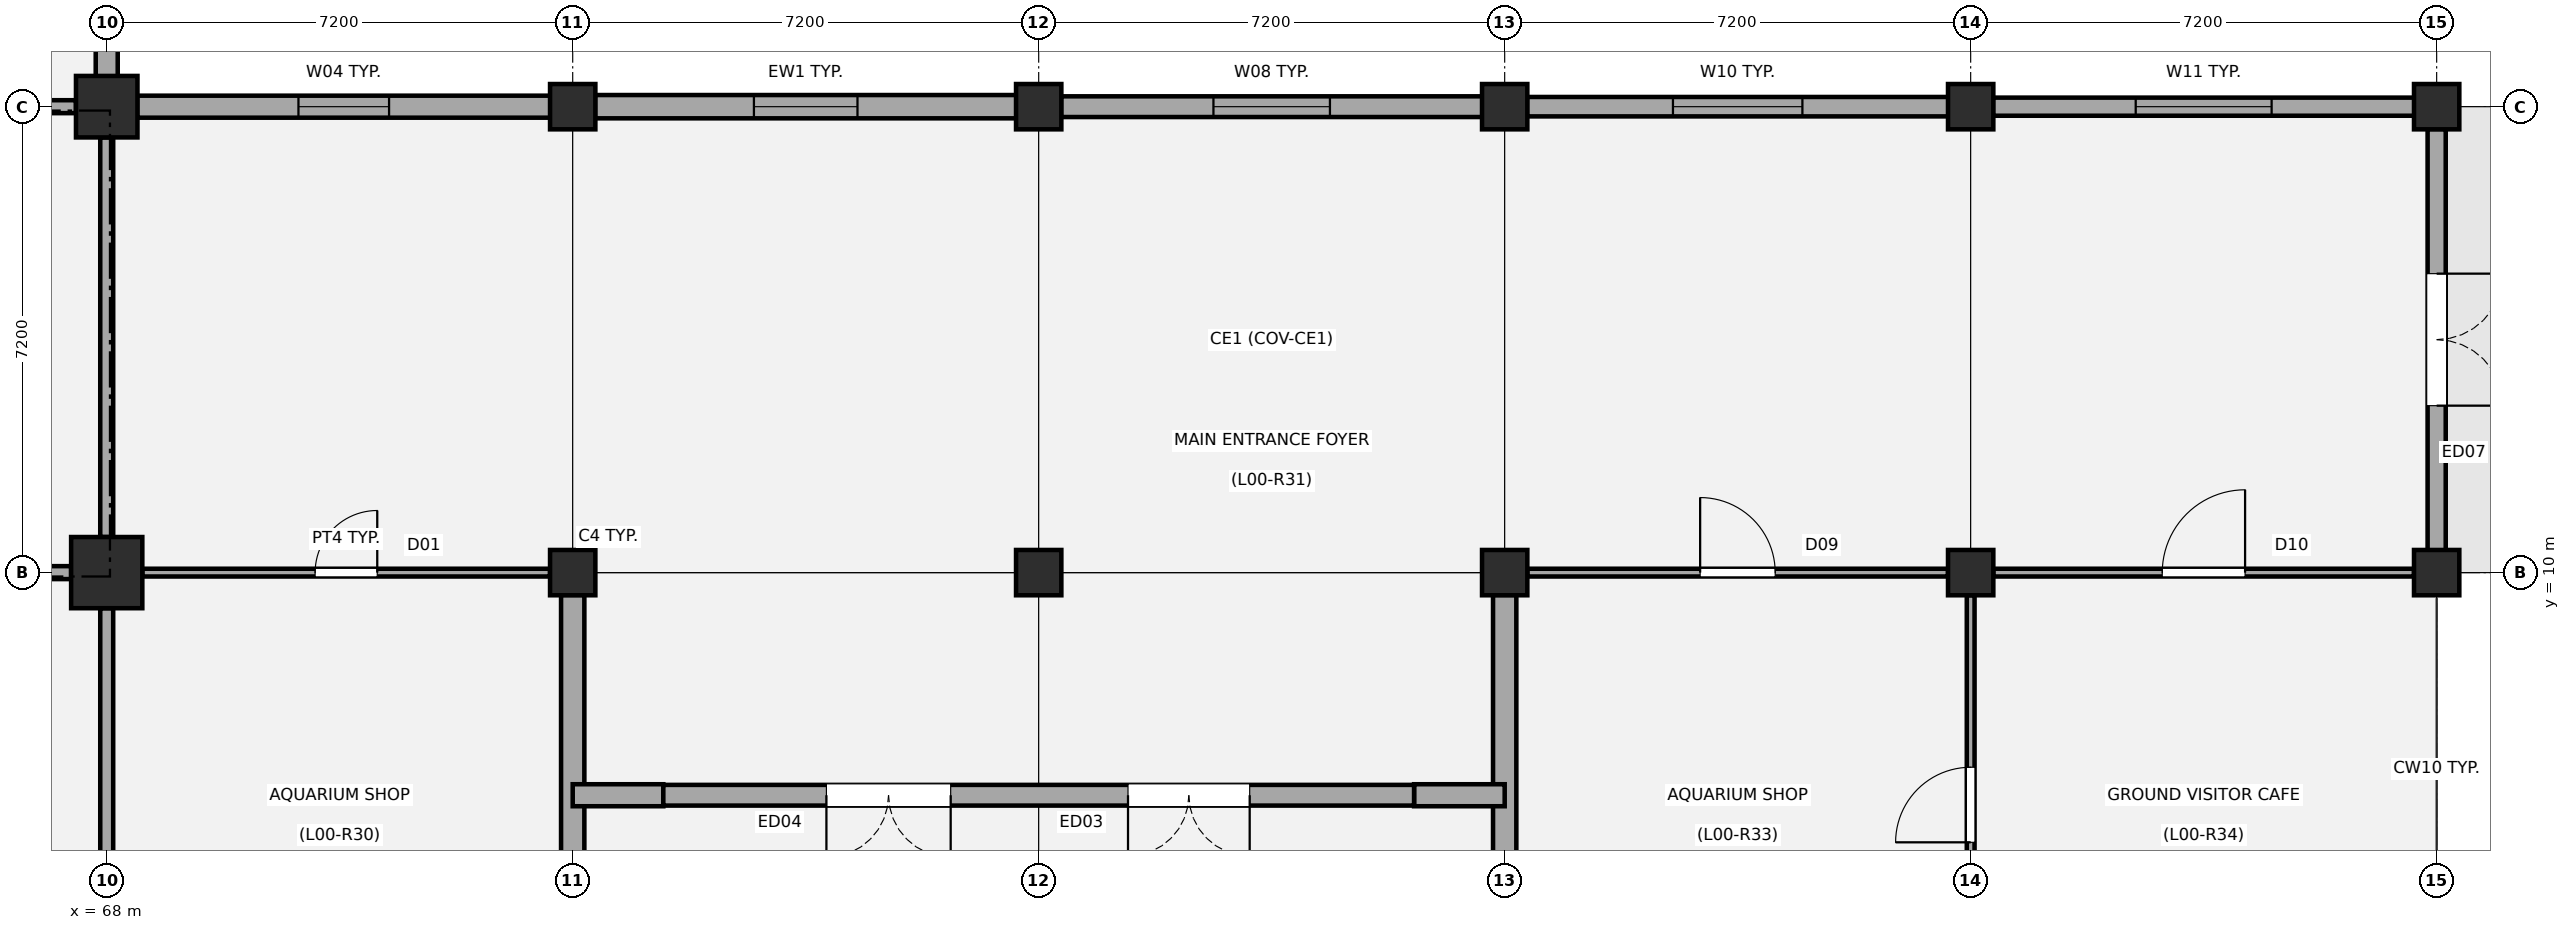
"""IFC4 building model, lengths in metres.
Left out: names, types, materials, properties, quantities, classifications, styles, units other than length and angle.
Written with IfcOpenShell. Run it as: python <this file> out.ifc"""

import sys

from ifc_helpers import new_model, si_unit, direction, frame, frame_2d, origin, origin_2d, place, context, subcontext, project, spatial, rectangle, extrude, element, fill, save


model = new_model("IFC4")
c1 = context("Model", 3, precision=1e-05, world=origin(), true_north=direction((0.0, 1.0)))
c2 = subcontext(c1, "Body", "Model", "MODEL_VIEW")
j1 = project(units=[si_unit("LENGTHUNIT", "METRE"), si_unit("PLANEANGLEUNIT", "RADIAN")], contexts=[c1])
p1 = place(None, origin())
s1 = spatial("IfcSite", under=j1, at=p1, CompositionType="ELEMENT")
p2 = place(p1, origin())
s2 = spatial("IfcBuilding", under=s1, at=p2, CompositionType="ELEMENT")
p3 = place(p2, origin())
s3 = spatial("IfcBuildingStorey", under=s2, at=p3, CompositionType="ELEMENT", Elevation=0.0)
p4 = place(p3, frame((68.0, 10.0, -0.35), z_axis=(0.0, 0.0, 1.0), x_axis=(1.0, 0.0, 0.0)))
e1 = element("IfcColumn", 1, at=p4, inside=s3, PredefinedType="COLUMN", context=c2, shape_type="SweptSolid", body=[
    extrude(rectangle(XDim=1.1, YDim=1.1, at=origin_2d()), origin(), (0.0, 0.0, 1.0), 5.03),
])
p5 = place(p3, frame((68.0, 17.2, -0.35), z_axis=(0.0, 0.0, 1.0), x_axis=(1.0, 0.0, 0.0)))
e2 = element("IfcColumn", 2, at=p5, inside=s3, PredefinedType="COLUMN", context=c2, shape_type="SweptSolid", body=[
    extrude(rectangle(XDim=0.95, YDim=0.95, at=origin_2d()), origin(), (0.0, 0.0, 1.0), 5.03),
])
for number, where, z_axis, x_axis in (
    (3, (75.2, 10.0, -0.35), (0.0, 0.0, 1.0), (1.0, 0.0, 0.0)),
    (4, (75.2, 17.2, -0.35), (0.0, 0.0, 1.0), (1.0, 0.0, 0.0)),
    (5, (82.4, 10.0, -0.35), (0.0, 0.0, 1.0), (1.0, 0.0, 0.0)),
    (6, (82.4, 17.2, -0.35), (0.0, 0.0, 1.0), (1.0, 0.0, 0.0)),
    (7, (89.6, 10.0, -0.35), (0.0, 0.0, 1.0), (1.0, 0.0, 0.0)),
    (8, (89.6, 17.2, -0.35), (0.0, 0.0, 1.0), (1.0, 0.0, 0.0)),
    (9, (96.8, 10.0, -0.35), (0.0, 0.0, 1.0), (1.0, 0.0, 0.0)),
    (10, (96.8, 17.2, -0.35), (0.0, 0.0, 1.0), (1.0, 0.0, 0.0)),
    (11, (104.0, 10.0, -0.35), (0.0, 0.0, 1.0), (1.0, 0.0, 0.0)),
    (12, (104.0, 17.2, -0.35), (0.0, 0.0, 1.0), (1.0, 0.0, 0.0)),
):
    element("IfcColumn", number, at=place(p3, frame(where, z_axis=z_axis, x_axis=x_axis)), inside=s3, PredefinedType="COLUMN", context=c2, shape_type="SweptSolid", body=[
        extrude(rectangle(XDim=0.7, YDim=0.7, at=origin_2d()), origin(), (0.0, 0.0, 1.0), 5.03),
    ])
p6 = place(p3, frame((68.47, 17.2, 0.0), z_axis=(0.0, 0.0, 1.0), x_axis=(1.0, 0.0, 0.0)))
e13 = element("IfcWall", 13, at=p6, inside=s3, PredefinedType="STANDARD", context=c2, shape_type="SweptSolid", body=[
    extrude(rectangle(XDim=6.385, YDim=0.34, at=frame_2d((3.192, 0.0))), origin(), (0.0, 0.0, 1.0), 3.67),
])
p7 = place(p6, frame((2.492, 0.0, 0.95)))
e14 = element("IfcOpeningElement", 14, at=p7, cuts=e13, PredefinedType="OPENING", context=c2, shape_type="SweptSolid", body=[
    extrude(rectangle(XDim=1.4, YDim=1.6, at=frame_2d((0.7, 0.8))), frame((0.0, 0.18, 0.0), z_axis=(0.0, -1.0, 0.0), x_axis=(1.0, 0.0, 0.0)), (0.0, 0.0, 1.0), 0.36),
])
p8 = place(p3, frame((75.545, 17.2, 0.0), z_axis=(0.0, 0.0, 1.0), x_axis=(1.0, 0.0, 0.0)))
e15 = element("IfcWall", 15, at=p8, inside=s3, PredefinedType="STANDARD", context=c2, shape_type="SweptSolid", body=[
    extrude(rectangle(XDim=6.51, YDim=0.36, at=frame_2d((3.255, 0.0))), origin(), (0.0, 0.0, 1.0), 3.67),
])
p9 = place(p8, frame((2.455, 0.0, 0.95)))
e16 = element("IfcOpeningElement", 16, at=p9, cuts=e15, PredefinedType="OPENING", context=c2, shape_type="SweptSolid", body=[
    extrude(rectangle(XDim=1.6, YDim=1.7, at=frame_2d((0.8, 0.85))), frame((0.0, 0.19, 0.0), z_axis=(0.0, -1.0, 0.0), x_axis=(1.0, 0.0, 0.0)), (0.0, 0.0, 1.0), 0.38),
])
p10 = place(p3, frame((82.745, 17.2, 0.0), z_axis=(0.0, 0.0, 1.0), x_axis=(1.0, 0.0, 0.0)))
e17 = element("IfcWall", 17, at=p10, inside=s3, PredefinedType="STANDARD", context=c2, shape_type="SweptSolid", body=[
    extrude(rectangle(XDim=6.51, YDim=0.32, at=frame_2d((3.255, 0.0))), origin(), (0.0, 0.0, 1.0), 3.67),
])
p11 = place(p10, frame((2.355, 0.0, 0.95)))
e18 = element("IfcOpeningElement", 18, at=p11, cuts=e17, PredefinedType="OPENING", context=c2, shape_type="SweptSolid", body=[
    extrude(rectangle(XDim=1.8, YDim=1.8, at=frame_2d((0.9, 0.9))), frame((0.0, 0.17, 0.0), z_axis=(0.0, -1.0, 0.0), x_axis=(1.0, 0.0, 0.0)), (0.0, 0.0, 1.0), 0.34),
])
p12 = place(p3, frame((89.945, 17.2, 0.0), z_axis=(0.0, 0.0, 1.0), x_axis=(1.0, 0.0, 0.0)))
e19 = element("IfcWall", 19, at=p12, inside=s3, PredefinedType="STANDARD", context=c2, shape_type="SweptSolid", body=[
    extrude(rectangle(XDim=6.51, YDim=0.3, at=frame_2d((3.255, 0.0))), origin(), (0.0, 0.0, 1.0), 3.67),
])
p13 = place(p12, frame((2.255, 0.0, 0.95)))
e20 = element("IfcOpeningElement", 20, at=p13, cuts=e19, PredefinedType="OPENING", context=c2, shape_type="SweptSolid", body=[
    extrude(rectangle(XDim=2.0, YDim=1.9, at=frame_2d((1.0, 0.95))), frame((0.0, 0.16, 0.0), z_axis=(0.0, -1.0, 0.0), x_axis=(1.0, 0.0, 0.0)), (0.0, 0.0, 1.0), 0.32),
])
p14 = place(p3, frame((97.145, 17.2, 0.0), z_axis=(0.0, 0.0, 1.0), x_axis=(1.0, 0.0, 0.0)))
e21 = element("IfcWall", 21, at=p14, inside=s3, PredefinedType="STANDARD", context=c2, shape_type="SweptSolid", body=[
    extrude(rectangle(XDim=6.51, YDim=0.28, at=frame_2d((3.255, 0.0))), origin(), (0.0, 0.0, 1.0), 3.67),
])
p15 = place(p14, frame((2.205, 0.0, 0.95)))
e22 = element("IfcOpeningElement", 22, at=p15, cuts=e21, PredefinedType="OPENING", context=c2, shape_type="SweptSolid", body=[
    extrude(rectangle(XDim=2.1, YDim=1.95, at=frame_2d((1.05, 0.975))), frame((0.0, 0.15, 0.0), z_axis=(0.0, -1.0, 0.0), x_axis=(1.0, 0.0, 0.0)), (0.0, 0.0, 1.0), 0.3),
])
p16 = place(p3, frame((68.0, 23.855, 0.0), z_axis=(0.0, 0.0, 1.0), x_axis=(0.0, -1.0, 0.0)))
e23 = element("IfcWall", 23, at=p16, inside=s3, PredefinedType="STANDARD", context=c2, shape_type="SweptSolid", body=[
    extrude(rectangle(XDim=6.185, YDim=0.34, at=frame_2d((3.093, 0.0))), origin(), (0.0, 0.0, 1.0), 2.47),
])
p17 = place(p3, frame((104.0, 16.855, 0.0), z_axis=(0.0, 0.0, 1.0), x_axis=(0.0, -1.0, 0.0)))
e24 = element("IfcWall", 24, at=p17, inside=s3, PredefinedType="STANDARD", context=c2, shape_type="SweptSolid", body=[
    extrude(rectangle(XDim=6.51, YDim=0.28, at=frame_2d((3.255, 0.0))), origin(), (0.0, 0.0, 1.0), 3.67),
])
p18 = place(p17, frame((2.235, 0.0, 0.0)))
e25 = element("IfcOpeningElement", 25, at=p18, cuts=e24, PredefinedType="OPENING", context=c2, shape_type="SweptSolid", body=[
    extrude(rectangle(XDim=2.04, YDim=2.32, at=frame_2d((1.02, 1.16))), frame((0.0, 0.15, 0.0), z_axis=(0.0, -1.0, 0.0), x_axis=(1.0, 0.0, 0.0)), (0.0, 0.0, 1.0), 0.3),
])
for number, where, z_axis, x_axis in (
    (26, (75.2, 1.56, 0.0), (0.0, 0.0, 1.0), (0.0, 1.0, 0.0)),
    (27, (89.6, 1.56, 0.0), (0.0, 0.0, 1.0), (0.0, 1.0, 0.0)),
):
    element("IfcWall", number, at=place(p3, frame(where, z_axis=z_axis, x_axis=x_axis)), inside=s3, PredefinedType="STANDARD", context=c2, shape_type="SweptSolid", body=[
        extrude(rectangle(XDim=8.095, YDim=0.36, at=frame_2d((4.047, 0.0))), origin(), (0.0, 0.0, 1.0), 3.67),
    ])
for number, where, z_axis, x_axis in (
    (28, (75.2, 6.56, 0.0), (0.0, 0.0, 1.0), (1.0, 0.0, 0.0)),
    (29, (88.2, 6.56, 0.0), (0.0, 0.0, 1.0), (1.0, 0.0, 0.0)),
):
    element("IfcWall", number, at=place(p3, frame(where, z_axis=z_axis, x_axis=x_axis)), inside=s3, PredefinedType="STANDARD", context=c2, shape_type="SweptSolid", body=[
        extrude(rectangle(XDim=1.4, YDim=0.34, at=frame_2d((0.7, 0.0))), origin(), (0.0, 0.0, 1.0), 8.87),
    ])
p19 = place(p3, frame((88.2, 6.56, 0.0), z_axis=(0.0, 0.0, 1.0), x_axis=(-1.0, 0.0, 0.0)))
e30 = element("IfcWall", 30, at=p19, inside=s3, PredefinedType="STANDARD", context=c2, shape_type="SweptSolid", body=[
    extrude(rectangle(XDim=11.6, YDim=0.32, at=frame_2d((5.8, 0.0))), origin(), (0.0, 0.0, 1.0), 2.68),
])
p20 = place(p19, frame((2.54, 0.0, 0.0)))
e31 = element("IfcOpeningElement", 31, at=p20, cuts=e30, PredefinedType="OPENING", context=c2, shape_type="SweptSolid", body=[
    extrude(rectangle(XDim=1.88, YDim=2.24, at=frame_2d((0.94, 1.12))), frame((0.0, 0.17, 0.0), z_axis=(0.0, -1.0, 0.0), x_axis=(1.0, 0.0, 0.0)), (0.0, 0.0, 1.0), 0.34),
])
p21 = place(p19, frame((7.16, 0.0, 0.0)))
e32 = element("IfcOpeningElement", 32, at=p21, cuts=e30, PredefinedType="OPENING", context=c2, shape_type="SweptSolid", body=[
    extrude(rectangle(XDim=1.92, YDim=2.26, at=frame_2d((0.96, 1.13))), frame((0.0, 0.17, 0.0), z_axis=(0.0, -1.0, 0.0), x_axis=(1.0, 0.0, 0.0)), (0.0, 0.0, 1.0), 0.34),
])
p22 = place(p3, frame((68.0, 10.55, 0.0), z_axis=(0.0, 0.0, 1.0), x_axis=(0.0, 1.0, 0.0)))
e33 = element("IfcWall", 33, at=p22, inside=s3, PredefinedType="PARTITIONING", context=c2, shape_type="SweptSolid", body=[
    extrude(rectangle(XDim=6.175, YDim=0.2, at=frame_2d((3.087, 0.0))), origin(), (0.0, 0.0, 1.0), 2.47),
])
p23 = place(p3, frame((65.34, 10.0, 0.0), z_axis=(0.0, 0.0, 1.0), x_axis=(1.0, 0.0, 0.0)))
e34 = element("IfcWall", 34, at=p23, inside=s3, PredefinedType="PARTITIONING", context=c2, shape_type="SweptSolid", body=[
    extrude(rectangle(XDim=2.11, YDim=0.2, at=frame_2d((1.055, 0.0))), origin(), (0.0, 0.0, 1.0), 2.37),
])
p24 = place(p23, frame((0.545, 0.0, 0.0)))
e35 = element("IfcOpeningElement", 35, at=p24, cuts=e34, PredefinedType="OPENING", context=c2, shape_type="SweptSolid", body=[
    extrude(rectangle(XDim=1.02, YDim=2.15, at=frame_2d((0.51, 1.075))), frame((0.0, 0.11, 0.0), z_axis=(0.0, -1.0, 0.0), x_axis=(1.0, 0.0, 0.0)), (0.0, 0.0, 1.0), 0.22),
])
p25 = place(p3, frame((65.34, 17.2, 0.0), z_axis=(0.0, 0.0, 1.0), x_axis=(1.0, 0.0, 0.0)))
e36 = element("IfcWall", 36, at=p25, inside=s3, PredefinedType="PARTITIONING", context=c2, shape_type="SweptSolid", body=[
    extrude(rectangle(XDim=2.185, YDim=0.2, at=frame_2d((1.092, 0.0))), origin(), (0.0, 0.0, 1.0), 2.37),
])
p26 = place(p3, frame((68.0, 3.275, 0.0), z_axis=(0.0, 0.0, 1.0), x_axis=(0.0, 1.0, 0.0)))
e37 = element("IfcWall", 37, at=p26, inside=s3, PredefinedType="PARTITIONING", context=c2, shape_type="SweptSolid", body=[
    extrude(rectangle(XDim=6.175, YDim=0.2, at=frame_2d((3.087, 0.0))), origin(), (0.0, 0.0, 1.0), 2.47),
])
p27 = place(p3, frame((68.55, 10.0, 0.0), z_axis=(0.0, 0.0, 1.0), x_axis=(1.0, 0.0, 0.0)))
e38 = element("IfcWall", 38, at=p27, inside=s3, PredefinedType="PARTITIONING", context=c2, shape_type="SweptSolid", body=[
    extrude(rectangle(XDim=6.3, YDim=0.12, at=frame_2d((3.15, 0.0))), origin(), (0.0, 0.0, 1.0), 3.52),
])
p28 = place(p27, frame((2.67, 0.0, 0.0)))
e39 = element("IfcOpeningElement", 39, at=p28, cuts=e38, PredefinedType="OPENING", context=c2, shape_type="SweptSolid", body=[
    extrude(rectangle(XDim=0.96, YDim=2.1, at=frame_2d((0.48, 1.05))), frame((0.0, 0.07, 0.0), z_axis=(0.0, -1.0, 0.0), x_axis=(1.0, 0.0, 0.0)), (0.0, 0.0, 1.0), 0.14),
])
p29 = place(p3, frame((96.8, 3.175, 0.0), z_axis=(0.0, 0.0, 1.0), x_axis=(0.0, 1.0, 0.0)))
e40 = element("IfcWall", 40, at=p29, inside=s3, PredefinedType="PARTITIONING", context=c2, shape_type="SweptSolid", body=[
    extrude(rectangle(XDim=6.475, YDim=0.12, at=frame_2d((3.237, 0.0))), origin(), (0.0, 0.0, 1.0), 3.62),
])
p30 = place(p29, frame((2.657, 0.0, 0.0)))
e41 = element("IfcOpeningElement", 41, at=p30, cuts=e40, PredefinedType="OPENING", context=c2, shape_type="SweptSolid", body=[
    extrude(rectangle(XDim=1.16, YDim=2.18, at=frame_2d((0.58, 1.09))), frame((0.0, 0.07, 0.0), z_axis=(0.0, -1.0, 0.0), x_axis=(1.0, 0.0, 0.0)), (0.0, 0.0, 1.0), 0.14),
])
p31 = place(p3, frame((89.95, 10.0, 0.0), z_axis=(0.0, 0.0, 1.0), x_axis=(1.0, 0.0, 0.0)))
e42 = element("IfcWall", 42, at=p31, inside=s3, PredefinedType="PARTITIONING", context=c2, shape_type="SweptSolid", body=[
    extrude(rectangle(XDim=6.5, YDim=0.12, at=frame_2d((3.25, 0.0))), origin(), (0.0, 0.0, 1.0), 3.62),
])
p32 = place(p31, frame((2.67, 0.0, 0.0)))
e43 = element("IfcOpeningElement", 43, at=p32, cuts=e42, PredefinedType="OPENING", context=c2, shape_type="SweptSolid", body=[
    extrude(rectangle(XDim=1.16, YDim=2.18, at=frame_2d((0.58, 1.09))), frame((0.0, 0.07, 0.0), z_axis=(0.0, -1.0, 0.0), x_axis=(1.0, 0.0, 0.0)), (0.0, 0.0, 1.0), 0.14),
])
p33 = place(p3, frame((97.15, 10.0, 0.0), z_axis=(0.0, 0.0, 1.0), x_axis=(1.0, 0.0, 0.0)))
e44 = element("IfcWall", 44, at=p33, inside=s3, PredefinedType="PARTITIONING", context=c2, shape_type="SweptSolid", body=[
    extrude(rectangle(XDim=6.5, YDim=0.12, at=frame_2d((3.25, 0.0))), origin(), (0.0, 0.0, 1.0), 3.52),
])
p34 = place(p33, frame((2.61, 0.0, 0.0)))
e45 = element("IfcOpeningElement", 45, at=p34, cuts=e44, PredefinedType="OPENING", context=c2, shape_type="SweptSolid", body=[
    extrude(rectangle(XDim=1.28, YDim=2.2, at=frame_2d((0.64, 1.1))), frame((0.0, 0.07, 0.0), z_axis=(0.0, -1.0, 0.0), x_axis=(1.0, 0.0, 0.0)), (0.0, 0.0, 1.0), 0.14),
])
p35 = place(p7, origin())
e46 = element("IfcWindow", 46, at=p35, inside=s3, PartitioningType="SINGLE_PANEL", PredefinedType="WINDOW", context=c2, shape_type="SweptSolid", body=[
    extrude(rectangle(XDim=1.4, YDim=1.6, at=frame_2d((0.7, 0.8))), frame((0.0, 0.03, 0.0), z_axis=(0.0, -1.0, 0.0), x_axis=(1.0, 0.0, 0.0)), (0.0, 0.0, 1.0), 0.06),
])
fill(e14, e46)
p36 = place(p9, origin())
e47 = element("IfcWindow", 47, at=p36, inside=s3, PartitioningType="SINGLE_PANEL", PredefinedType="WINDOW", context=c2, shape_type="SweptSolid", body=[
    extrude(rectangle(XDim=1.6, YDim=1.7, at=frame_2d((0.8, 0.85))), frame((0.0, 0.03, 0.0), z_axis=(0.0, -1.0, 0.0), x_axis=(1.0, 0.0, 0.0)), (0.0, 0.0, 1.0), 0.06),
])
fill(e16, e47)
p37 = place(p11, origin())
e48 = element("IfcWindow", 48, at=p37, inside=s3, PartitioningType="SINGLE_PANEL", PredefinedType="WINDOW", context=c2, shape_type="SweptSolid", body=[
    extrude(rectangle(XDim=1.8, YDim=1.8, at=frame_2d((0.9, 0.9))), frame((0.0, 0.03, 0.0), z_axis=(0.0, -1.0, 0.0), x_axis=(1.0, 0.0, 0.0)), (0.0, 0.0, 1.0), 0.06),
])
fill(e18, e48)
p38 = place(p13, origin())
e49 = element("IfcWindow", 49, at=p38, inside=s3, PartitioningType="SINGLE_PANEL", PredefinedType="WINDOW", context=c2, shape_type="SweptSolid", body=[
    extrude(rectangle(XDim=2.0, YDim=1.9, at=frame_2d((1.0, 0.95))), frame((0.0, 0.03, 0.0), z_axis=(0.0, -1.0, 0.0), x_axis=(1.0, 0.0, 0.0)), (0.0, 0.0, 1.0), 0.06),
])
fill(e20, e49)
p39 = place(p15, origin())
e50 = element("IfcWindow", 50, at=p39, inside=s3, PartitioningType="SINGLE_PANEL", PredefinedType="WINDOW", context=c2, shape_type="SweptSolid", body=[
    extrude(rectangle(XDim=2.1, YDim=1.95, at=frame_2d((1.05, 0.975))), frame((0.0, 0.03, 0.0), z_axis=(0.0, -1.0, 0.0), x_axis=(1.0, 0.0, 0.0)), (0.0, 0.0, 1.0), 0.06),
])
fill(e22, e50)
p40 = place(p18, origin())
e51 = element("IfcDoor", 51, at=p40, inside=s3, OperationType="DOUBLE_DOOR_SINGLE_SWING", PredefinedType="DOOR", context=c2, shape_type="SweptSolid", body=[
    extrude(rectangle(XDim=2.04, YDim=2.32, at=frame_2d((1.02, 1.16))), frame((0.0, 0.025, 0.0), z_axis=(0.0, -1.0, 0.0), x_axis=(1.0, 0.0, 0.0)), (0.0, 0.0, 1.0), 0.05),
])
fill(e25, e51)
p41 = place(p20, origin())
e52 = element("IfcDoor", 52, at=p41, inside=s3, OperationType="DOUBLE_DOOR_SINGLE_SWING", PredefinedType="DOOR", context=c2, shape_type="SweptSolid", body=[
    extrude(rectangle(XDim=1.88, YDim=2.24, at=frame_2d((0.94, 1.12))), frame((0.0, 0.025, 0.0), z_axis=(0.0, -1.0, 0.0), x_axis=(1.0, 0.0, 0.0)), (0.0, 0.0, 1.0), 0.05),
])
fill(e31, e52)
p42 = place(p21, origin())
e53 = element("IfcDoor", 53, at=p42, inside=s3, OperationType="DOUBLE_DOOR_SINGLE_SWING", PredefinedType="DOOR", context=c2, shape_type="SweptSolid", body=[
    extrude(rectangle(XDim=1.92, YDim=2.26, at=frame_2d((0.96, 1.13))), frame((0.0, 0.025, 0.0), z_axis=(0.0, -1.0, 0.0), x_axis=(1.0, 0.0, 0.0)), (0.0, 0.0, 1.0), 0.05),
])
fill(e32, e53)
p43 = place(p28, origin())
e54 = element("IfcDoor", 54, at=p43, inside=s3, OperationType="SINGLE_SWING_RIGHT", PredefinedType="DOOR", context=c2, shape_type="SweptSolid", body=[
    extrude(rectangle(XDim=0.96, YDim=2.1, at=frame_2d((0.48, 1.05))), frame((0.0, 0.025, 0.0), z_axis=(0.0, -1.0, 0.0), x_axis=(1.0, 0.0, 0.0)), (0.0, 0.0, 1.0), 0.05),
])
fill(e39, e54)
p44 = place(p32, origin())
e55 = element("IfcDoor", 55, at=p44, inside=s3, OperationType="SINGLE_SWING_LEFT", PredefinedType="DOOR", context=c2, shape_type="SweptSolid", body=[
    extrude(rectangle(XDim=1.16, YDim=2.18, at=frame_2d((0.58, 1.09))), frame((0.0, 0.025, 0.0), z_axis=(0.0, -1.0, 0.0), x_axis=(1.0, 0.0, 0.0)), (0.0, 0.0, 1.0), 0.05),
])
fill(e43, e55)
p45 = place(p34, origin())
e56 = element("IfcDoor", 56, at=p45, inside=s3, OperationType="SINGLE_SWING_RIGHT", PredefinedType="DOOR", context=c2, shape_type="SweptSolid", body=[
    extrude(rectangle(XDim=1.28, YDim=2.2, at=frame_2d((0.64, 1.1))), frame((0.0, 0.025, 0.0), z_axis=(0.0, -1.0, 0.0), x_axis=(1.0, 0.0, 0.0)), (0.0, 0.0, 1.0), 0.05),
])
fill(e45, e56)
p46 = place(p30, origin())
e57 = element("IfcDoor", 57, at=p46, inside=s3, OperationType="SINGLE_SWING_LEFT", PredefinedType="DOOR", context=c2, shape_type="SweptSolid", body=[
    extrude(rectangle(XDim=1.16, YDim=2.18, at=frame_2d((0.58, 1.09))), frame((0.0, 0.025, 0.0), z_axis=(0.0, -1.0, 0.0), x_axis=(1.0, 0.0, 0.0)), (0.0, 0.0, 1.0), 0.05),
])
fill(e41, e57)
save(model, sys.argv[1])
